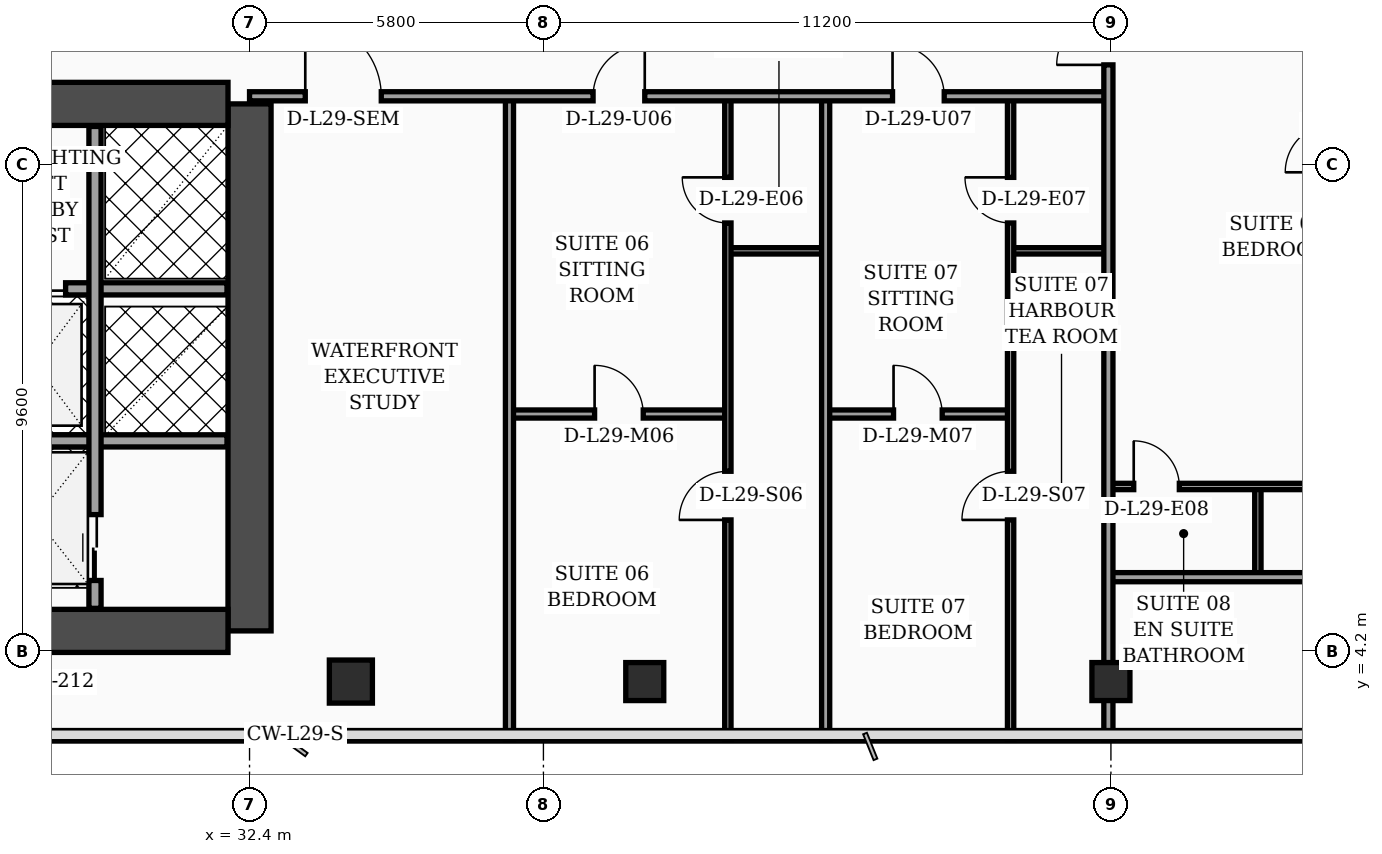
"""IFC4 building model, lengths in metres.
Left out: names, types, materials, properties, quantities, classifications, styles, units other than length and angle.
Written with IfcOpenShell. Run it as: python <this file> out.ifc"""

import sys

from ifc_helpers import new_model, si_unit, direction, frame, frame_2d, origin, origin_2d, place, context, subcontext, project, spatial, rectangle, hollow_rectangle, extrude, element, fill, save


model = new_model("IFC4")
c1 = context("Model", 3, precision=1e-05, world=origin(), true_north=direction((0.0, 1.0)))
c2 = subcontext(c1, "Body", "Model", "MODEL_VIEW")
j1 = project(units=[si_unit("LENGTHUNIT", "METRE"), si_unit("PLANEANGLEUNIT", "RADIAN")], contexts=[c1])
p1 = place(None, origin())
s1 = spatial("IfcSite", under=j1, at=p1, CompositionType="ELEMENT")
p2 = place(p1, origin())
s2 = spatial("IfcBuilding", under=s1, at=p2, CompositionType="ELEMENT")
p3 = place(p2, frame((0.0, 0.0, 120.2)))
s3 = spatial("IfcBuildingStorey", under=s2, at=p3, CompositionType="ELEMENT", Elevation=120.2)
p4 = place(p3, frame((32.4, 4.6, 0.0), z_axis=(0.0, 0.0, 1.0), x_axis=(0.0, 1.0, 0.0)))
e1 = element("IfcWall", 1, at=p4, inside=s3, PredefinedType="SHEAR", context=c2, shape_type="SweptSolid", body=[
    extrude(rectangle(XDim=10.4, YDim=0.85, at=frame_2d((5.2, 0.0))), origin(), (0.0, 0.0, 1.0), 3.56),
])
p5 = place(p3, frame((22.025, 15.0, 0.0), z_axis=(0.0, 0.0, 1.0), x_axis=(1.0, 0.0, 0.0)))
e2 = element("IfcWall", 2, at=p5, inside=s3, PredefinedType="SHEAR", context=c2, shape_type="SweptSolid", body=[
    extrude(rectangle(XDim=9.95, YDim=0.85, at=frame_2d((4.975, 0.0))), origin(), (0.0, 0.0, 1.0), 3.56),
])
p6 = place(p5, frame((4.88, 0.0, 0.0)))
e3 = element("IfcOpeningElement", 3, at=p6, cuts=e2, PredefinedType="OPENING", context=c2, shape_type="SweptSolid", body=[
    extrude(rectangle(XDim=1.1, YDim=2.2, at=frame_2d((0.55, 1.1))), frame((0.0, 0.435, 0.0), z_axis=(0.0, -1.0, 0.0), x_axis=(1.0, 0.0, 0.0)), (0.0, 0.0, 1.0), 0.87),
])
p7 = place(p3, frame((22.025, 4.6, 0.0), z_axis=(0.0, 0.0, 1.0), x_axis=(1.0, 0.0, 0.0)))
e4 = element("IfcWall", 4, at=p7, inside=s3, PredefinedType="SHEAR", context=c2, shape_type="SweptSolid", body=[
    extrude(rectangle(XDim=9.95, YDim=0.85, at=frame_2d((4.975, 0.0))), origin(), (0.0, 0.0, 1.0), 3.56),
])
p8 = place(p3, frame((34.4, 3.6, 0.0), z_axis=(0.0, 0.0, 1.0), x_axis=(1.0, 0.0, 0.0)))
e5 = element("IfcColumn", 5, at=p8, inside=s3, PredefinedType="COLUMN", context=c2, shape_type="SweptSolid", body=[
    extrude(hollow_rectangle(XDim=0.85, YDim=0.85, WallThickness=0.036, at=origin_2d()), origin(), (0.0, 0.0, 1.0), 3.56),
])
for number, where, z_axis, x_axis in (
    (6, (40.2, 3.6, 0.0), (0.0, 0.0, 1.0), (1.0, 0.0, 0.0)),
    (7, (49.4, 3.6, 0.0), (0.0, 0.0, 1.0), (1.0, 0.0, 0.0)),
):
    element("IfcColumn", number, at=place(p3, frame(where, z_axis=z_axis, x_axis=x_axis)), inside=s3, PredefinedType="COLUMN", context=c2, shape_type="SweptSolid", body=[
        extrude(hollow_rectangle(XDim=0.75, YDim=0.75, WallThickness=0.032, at=origin_2d()), origin(), (0.0, 0.0, 1.0), 3.56),
    ])
p9 = place(p3, frame((59.23, 5.505, 0.0), z_axis=(0.0, 0.0, 1.0), x_axis=(-0.300509063924, 0.953778958931, 0.0)))
e8 = element("IfcWall", 8, at=p9, inside=s3, PredefinedType="SOLIDWALL", context=c2, shape_type="SweptSolid", body=[
    extrude(rectangle(XDim=30.814, YDim=0.32, at=frame_2d((15.407, 0.0))), origin(), (0.0, 0.0, 1.0), 3.56),
])
p10 = place(p9, frame((4.747, 0.0, 0.0)))
e9 = element("IfcOpeningElement", 9, at=p10, cuts=e8, PredefinedType="OPENING", context=c2, shape_type="SweptSolid", body=[
    extrude(rectangle(XDim=1.4, YDim=2.25, at=frame_2d((0.7, 1.125))), frame((0.0, 0.17, 0.0), z_axis=(0.0, -1.0, 0.0), x_axis=(1.0, 0.0, 0.0)), (0.0, 0.0, 1.0), 0.34),
])
p11 = place(p9, frame((2.65, 0.0, 0.75)))
e10 = element("IfcOpeningElement", 10, at=p11, cuts=e8, PredefinedType="OPENING", context=c2, shape_type="SweptSolid", body=[
    extrude(rectangle(XDim=1.5, YDim=1.6, at=frame_2d((0.75, 0.8))), frame((0.0, 0.17, 0.0), z_axis=(0.0, -1.0, 0.0), x_axis=(1.0, 0.0, 0.0)), (0.0, 0.0, 1.0), 0.34),
])
p12 = place(p9, frame((7.8, 0.0, 0.75)))
e11 = element("IfcOpeningElement", 11, at=p12, cuts=e8, PredefinedType="OPENING", context=c2, shape_type="SweptSolid", body=[
    extrude(rectangle(XDim=1.5, YDim=1.6, at=frame_2d((0.75, 0.8))), frame((0.0, 0.17, 0.0), z_axis=(0.0, -1.0, 0.0), x_axis=(1.0, 0.0, 0.0)), (0.0, 0.0, 1.0), 0.34),
])
p13 = place(p9, frame((10.9, 0.0, 0.75)))
e12 = element("IfcOpeningElement", 12, at=p13, cuts=e8, PredefinedType="OPENING", context=c2, shape_type="SweptSolid", body=[
    extrude(rectangle(XDim=1.5, YDim=1.6, at=frame_2d((0.75, 0.8))), frame((0.0, 0.17, 0.0), z_axis=(0.0, -1.0, 0.0), x_axis=(1.0, 0.0, 0.0)), (0.0, 0.0, 1.0), 0.34),
])
p14 = place(p9, frame((14.0, 0.0, 0.75)))
e13 = element("IfcOpeningElement", 13, at=p14, cuts=e8, PredefinedType="OPENING", context=c2, shape_type="SweptSolid", body=[
    extrude(rectangle(XDim=1.5, YDim=1.6, at=frame_2d((0.75, 0.8))), frame((0.0, 0.17, 0.0), z_axis=(0.0, -1.0, 0.0), x_axis=(1.0, 0.0, 0.0)), (0.0, 0.0, 1.0), 0.34),
])
p15 = place(p9, frame((17.1, 0.0, 0.75)))
e14 = element("IfcOpeningElement", 14, at=p15, cuts=e8, PredefinedType="OPENING", context=c2, shape_type="SweptSolid", body=[
    extrude(rectangle(XDim=1.5, YDim=1.6, at=frame_2d((0.75, 0.8))), frame((0.0, 0.17, 0.0), z_axis=(0.0, -1.0, 0.0), x_axis=(1.0, 0.0, 0.0)), (0.0, 0.0, 1.0), 0.34),
])
p16 = place(p9, frame((20.2, 0.0, 0.75)))
e15 = element("IfcOpeningElement", 15, at=p16, cuts=e8, PredefinedType="OPENING", context=c2, shape_type="SweptSolid", body=[
    extrude(rectangle(XDim=1.5, YDim=1.6, at=frame_2d((0.75, 0.8))), frame((0.0, 0.17, 0.0), z_axis=(0.0, -1.0, 0.0), x_axis=(1.0, 0.0, 0.0)), (0.0, 0.0, 1.0), 0.34),
])
p17 = place(p9, frame((23.3, 0.0, 0.75)))
e16 = element("IfcOpeningElement", 16, at=p17, cuts=e8, PredefinedType="OPENING", context=c2, shape_type="SweptSolid", body=[
    extrude(rectangle(XDim=1.5, YDim=1.6, at=frame_2d((0.75, 0.8))), frame((0.0, 0.17, 0.0), z_axis=(0.0, -1.0, 0.0), x_axis=(1.0, 0.0, 0.0)), (0.0, 0.0, 1.0), 0.34),
])
p18 = place(p9, frame((26.4, 0.0, 0.75)))
e17 = element("IfcOpeningElement", 17, at=p18, cuts=e8, PredefinedType="OPENING", context=c2, shape_type="SweptSolid", body=[
    extrude(rectangle(XDim=1.5, YDim=1.6, at=frame_2d((0.75, 0.8))), frame((0.0, 0.17, 0.0), z_axis=(0.0, -1.0, 0.0), x_axis=(1.0, 0.0, 0.0)), (0.0, 0.0, 1.0), 0.34),
])
p19 = place(p3, frame((27.02, 11.35, 0.0), z_axis=(0.0, 0.0, 1.0), x_axis=(1.0, 0.0, 0.0)))
e18 = element("IfcWall", 18, at=p19, inside=s3, PredefinedType="SOLIDWALL", context=c2, shape_type="SweptSolid", body=[
    extrude(rectangle(XDim=4.935, YDim=0.24, at=frame_2d((2.468, 0.0))), origin(), (0.0, 0.0, 1.0), 3.56),
])
p20 = place(p19, frame((0.45, 0.0, 0.0)))
e19 = element("IfcOpeningElement", 19, at=p20, cuts=e18, PredefinedType="OPENING", context=c2, shape_type="SweptSolid", body=[
    extrude(rectangle(XDim=1.3, YDim=2.35, at=frame_2d((0.65, 1.175))), frame((0.0, 0.13, 0.0), z_axis=(0.0, -1.0, 0.0), x_axis=(1.0, 0.0, 0.0)), (0.0, 0.0, 1.0), 0.26),
])
p21 = place(p3, frame((27.02, 8.35, 0.0), z_axis=(0.0, 0.0, 1.0), x_axis=(1.0, 0.0, 0.0)))
e20 = element("IfcWall", 20, at=p21, inside=s3, PredefinedType="SOLIDWALL", context=c2, shape_type="SweptSolid", body=[
    extrude(rectangle(XDim=4.935, YDim=0.24, at=frame_2d((2.468, 0.0))), origin(), (0.0, 0.0, 1.0), 3.09),
])
p22 = place(p3, frame((29.35, 5.045, 0.0), z_axis=(0.0, 0.0, 1.0), x_axis=(0.0, 1.0, 0.0)))
e21 = element("IfcWall", 21, at=p22, inside=s3, PredefinedType="SOLIDWALL", context=c2, shape_type="SweptSolid", body=[
    extrude(rectangle(XDim=9.51, YDim=0.24, at=frame_2d((4.755, 0.0))), origin(), (0.0, 0.0, 1.0), 3.56),
])
p23 = place(p22, frame((0.55, 0.0, 0.0)))
e22 = element("IfcOpeningElement", 22, at=p23, cuts=e21, PredefinedType="OPENING", context=c2, shape_type="SweptSolid", body=[
    extrude(rectangle(XDim=1.3, YDim=2.35, at=frame_2d((0.65, 1.175))), frame((0.0, 0.13, 0.0), z_axis=(0.0, -1.0, 0.0), x_axis=(1.0, 0.0, 0.0)), (0.0, 0.0, 1.0), 0.26),
])
p24 = place(p3, frame((41.84, 12.1, 0.0), z_axis=(0.0, 0.0, 1.0), x_axis=(1.0, 0.0, 0.0)))
e23 = element("IfcWall", 23, at=p24, inside=s3, PredefinedType="PARTITIONING", context=c2, shape_type="SweptSolid", body=[
    extrude(rectangle(XDim=1.93, YDim=0.125, at=frame_2d((0.965, 0.0))), origin(), (0.0, 0.0, 1.0), 3.56),
])
p25 = place(p3, frame((37.53, 8.88, 0.0), z_axis=(0.0, 0.0, 1.0), x_axis=(1.0, 0.0, 0.0)))
e24 = element("IfcWall", 24, at=p25, inside=s3, PredefinedType="PARTITIONING", context=c2, shape_type="SweptSolid", body=[
    extrude(rectangle(XDim=4.31, YDim=0.16, at=frame_2d((2.155, 0.0))), origin(), (0.0, 0.0, 1.0), 3.09),
])
p26 = place(p25, frame((1.68, 0.0, 0.0)))
e25 = element("IfcOpeningElement", 25, at=p26, cuts=e24, PredefinedType="OPENING", context=c2, shape_type="SweptSolid", body=[
    extrude(rectangle(XDim=0.96, YDim=2.2, at=frame_2d((0.48, 1.1))), frame((0.0, 0.09, 0.0), z_axis=(0.0, -1.0, 0.0), x_axis=(1.0, 0.0, 0.0)), (0.0, 0.0, 1.0), 0.18),
])
p27 = place(p3, frame((41.84, 2.44, 0.0), z_axis=(0.0, 0.0, 1.0), x_axis=(0.0, 1.0, 0.0)))
e26 = element("IfcWall", 26, at=p27, inside=s3, PredefinedType="PARTITIONING", context=c2, shape_type="SweptSolid", body=[
    extrude(rectangle(XDim=12.71, YDim=0.125, at=frame_2d((6.355, 0.0))), origin(), (0.0, 0.0, 1.0), 3.04),
])
p28 = place(p27, frame((4.35, 0.0, 0.0)))
e27 = element("IfcOpeningElement", 27, at=p28, cuts=e26, PredefinedType="OPENING", context=c2, shape_type="SweptSolid", body=[
    extrude(rectangle(XDim=0.96, YDim=2.2, at=frame_2d((0.48, 1.1))), frame((0.0, 0.073, 0.0), z_axis=(0.0, -1.0, 0.0), x_axis=(1.0, 0.0, 0.0)), (0.0, 0.0, 1.0), 0.145),
])
p29 = place(p27, frame((10.21, 0.0, 0.0)))
e28 = element("IfcOpeningElement", 28, at=p29, cuts=e26, PredefinedType="OPENING", context=c2, shape_type="SweptSolid", body=[
    extrude(rectangle(XDim=0.9, YDim=2.15, at=frame_2d((0.45, 1.075))), frame((0.0, 0.073, 0.0), z_axis=(0.0, -1.0, 0.0), x_axis=(1.0, 0.0, 0.0)), (0.0, 0.0, 1.0), 0.145),
])
p30 = place(p3, frame((37.53, 2.44, 0.0), z_axis=(0.0, 0.0, 1.0), x_axis=(0.0, 1.0, 0.0)))
e29 = element("IfcWall", 29, at=p30, inside=s3, PredefinedType="PARTITIONING", context=c2, shape_type="SweptSolid", body=[
    extrude(rectangle(XDim=12.71, YDim=0.16, at=frame_2d((6.355, 0.0))), origin(), (0.0, 0.0, 1.0), 2.84),
])
p31 = place(p3, frame((47.42, 12.1, 0.0), z_axis=(0.0, 0.0, 1.0), x_axis=(1.0, 0.0, 0.0)))
e30 = element("IfcWall", 30, at=p31, inside=s3, PredefinedType="PARTITIONING", context=c2, shape_type="SweptSolid", body=[
    extrude(rectangle(XDim=1.93, YDim=0.125, at=frame_2d((0.965, 0.0))), origin(), (0.0, 0.0, 1.0), 2.84),
])
p32 = place(p3, frame((43.77, 8.88, 0.0), z_axis=(0.0, 0.0, 1.0), x_axis=(1.0, 0.0, 0.0)))
e31 = element("IfcWall", 31, at=p32, inside=s3, PredefinedType="PARTITIONING", context=c2, shape_type="SweptSolid", body=[
    extrude(rectangle(XDim=3.65, YDim=0.16, at=frame_2d((1.825, 0.0))), origin(), (0.0, 0.0, 1.0), 3.09),
])
p33 = place(p32, frame((1.34, 0.0, 0.0)))
e32 = element("IfcOpeningElement", 32, at=p33, cuts=e31, PredefinedType="OPENING", context=c2, shape_type="SweptSolid", body=[
    extrude(rectangle(XDim=0.96, YDim=2.2, at=frame_2d((0.48, 1.1))), frame((0.0, 0.09, 0.0), z_axis=(0.0, -1.0, 0.0), x_axis=(1.0, 0.0, 0.0)), (0.0, 0.0, 1.0), 0.18),
])
p34 = place(p3, frame((47.42, 2.44, 0.0), z_axis=(0.0, 0.0, 1.0), x_axis=(0.0, 1.0, 0.0)))
e33 = element("IfcWall", 33, at=p34, inside=s3, PredefinedType="PARTITIONING", context=c2, shape_type="SweptSolid", body=[
    extrude(rectangle(XDim=12.71, YDim=0.125, at=frame_2d((6.355, 0.0))), origin(), (0.0, 0.0, 1.0), 2.84),
])
p35 = place(p34, frame((4.35, 0.0, 0.0)))
e34 = element("IfcOpeningElement", 34, at=p35, cuts=e33, PredefinedType="OPENING", context=c2, shape_type="SweptSolid", body=[
    extrude(rectangle(XDim=0.96, YDim=2.2, at=frame_2d((0.48, 1.1))), frame((0.0, 0.073, 0.0), z_axis=(0.0, -1.0, 0.0), x_axis=(1.0, 0.0, 0.0)), (0.0, 0.0, 1.0), 0.145),
])
p36 = place(p34, frame((10.21, 0.0, 0.0)))
e35 = element("IfcOpeningElement", 35, at=p36, cuts=e33, PredefinedType="OPENING", context=c2, shape_type="SweptSolid", body=[
    extrude(rectangle(XDim=0.9, YDim=2.15, at=frame_2d((0.45, 1.075))), frame((0.0, 0.073, 0.0), z_axis=(0.0, -1.0, 0.0), x_axis=(1.0, 0.0, 0.0)), (0.0, 0.0, 1.0), 0.145),
])
p37 = place(p3, frame((43.77, 2.44, 0.0), z_axis=(0.0, 0.0, 1.0), x_axis=(0.0, 1.0, 0.0)))
e36 = element("IfcWall", 36, at=p37, inside=s3, PredefinedType="PARTITIONING", context=c2, shape_type="SweptSolid", body=[
    extrude(rectangle(XDim=12.71, YDim=0.16, at=frame_2d((6.355, 0.0))), origin(), (0.0, 0.0, 1.0), 3.04),
])
p38 = place(p3, frame((32.4, 15.15, 0.0), z_axis=(0.0, 0.0, 1.0), x_axis=(1.0, 0.0, 0.0)))
e37 = element("IfcWall", 37, at=p38, inside=s3, PredefinedType="PARTITIONING", context=c2, shape_type="SweptSolid", body=[
    extrude(rectangle(XDim=16.95, YDim=0.18, at=frame_2d((8.475, 0.0))), origin(), (0.0, 0.0, 1.0), 2.84),
])
p39 = place(p38, frame((1.1, 0.0, 0.0)))
e38 = element("IfcOpeningElement", 38, at=p39, cuts=e37, PredefinedType="OPENING", context=c2, shape_type="SweptSolid", body=[
    extrude(rectangle(XDim=1.5, YDim=2.22, at=frame_2d((0.75, 1.11))), frame((0.0, 0.1, 0.0), z_axis=(0.0, -1.0, 0.0), x_axis=(1.0, 0.0, 0.0)), (0.0, 0.0, 1.0), 0.2),
])
p40 = place(p38, frame((6.78, 0.0, 0.0)))
e39 = element("IfcOpeningElement", 39, at=p40, cuts=e37, PredefinedType="OPENING", context=c2, shape_type="SweptSolid", body=[
    extrude(rectangle(XDim=1.02, YDim=2.2, at=frame_2d((0.51, 1.1))), frame((0.0, 0.1, 0.0), z_axis=(0.0, -1.0, 0.0), x_axis=(1.0, 0.0, 0.0)), (0.0, 0.0, 1.0), 0.2),
])
p41 = place(p38, frame((12.69, 0.0, 0.0)))
e40 = element("IfcOpeningElement", 40, at=p41, cuts=e37, PredefinedType="OPENING", context=c2, shape_type="SweptSolid", body=[
    extrude(rectangle(XDim=1.02, YDim=2.2, at=frame_2d((0.51, 1.1))), frame((0.0, 0.1, 0.0), z_axis=(0.0, -1.0, 0.0), x_axis=(1.0, 0.0, 0.0)), (0.0, 0.0, 1.0), 0.2),
])
p42 = place(p3, frame((52.3, 5.66, 0.0), z_axis=(0.0, 0.0, 1.0), x_axis=(0.0, 1.0, 0.0)))
e41 = element("IfcWall", 41, at=p42, inside=s3, PredefinedType="PARTITIONING", context=c2, shape_type="SweptSolid", body=[
    extrude(rectangle(XDim=1.79, YDim=0.125, at=frame_2d((0.895, 0.0))), origin(), (0.0, 0.0, 1.0), 3.56),
])
p43 = place(p3, frame((49.35, 7.45, 0.0), z_axis=(0.0, 0.0, 1.0), x_axis=(1.0, 0.0, 0.0)))
e42 = element("IfcWall", 42, at=p43, inside=s3, PredefinedType="PARTITIONING", context=c2, shape_type="SweptSolid", body=[
    extrude(rectangle(XDim=9.21, YDim=0.125, at=frame_2d((4.605, 0.0))), origin(), (0.0, 0.0, 1.0), 3.04),
])
p44 = place(p43, frame((0.5, 0.0, 0.0)))
e43 = element("IfcOpeningElement", 43, at=p44, cuts=e42, PredefinedType="OPENING", context=c2, shape_type="SweptSolid", body=[
    extrude(rectangle(XDim=0.9, YDim=2.15, at=frame_2d((0.45, 1.075))), frame((0.0, 0.073, 0.0), z_axis=(0.0, -1.0, 0.0), x_axis=(1.0, 0.0, 0.0)), (0.0, 0.0, 1.0), 0.145),
])
p45 = place(p43, frame((5.04, 0.0, 0.0)))
e44 = element("IfcOpeningElement", 44, at=p45, cuts=e42, PredefinedType="OPENING", context=c2, shape_type="SweptSolid", body=[
    extrude(rectangle(XDim=0.96, YDim=2.2, at=frame_2d((0.48, 1.1))), frame((0.0, 0.073, 0.0), z_axis=(0.0, -1.0, 0.0), x_axis=(1.0, 0.0, 0.0)), (0.0, 0.0, 1.0), 0.145),
])
p46 = place(p3, frame((49.35, 5.66, 0.0), z_axis=(0.0, 0.0, 1.0), x_axis=(1.0, 0.0, 0.0)))
e45 = element("IfcWall", 45, at=p46, inside=s3, PredefinedType="PARTITIONING", context=c2, shape_type="SweptSolid", body=[
    extrude(rectangle(XDim=6.65, YDim=0.18, at=frame_2d((3.325, 0.0))), origin(), (0.0, 0.0, 1.0), 2.84),
])
p47 = place(p3, frame((49.35, 2.44, 0.0), z_axis=(0.0, 0.0, 1.0), x_axis=(0.0, 1.0, 0.0)))
e46 = element("IfcWall", 46, at=p47, inside=s3, PredefinedType="PARTITIONING", context=c2, shape_type="SweptSolid", body=[
    extrude(rectangle(XDim=18.36, YDim=0.18, at=frame_2d((9.18, 0.0))), origin(), (0.0, 0.0, 1.0), 2.84),
])
p48 = place(p47, frame((13.33, 0.0, 0.0)))
e47 = element("IfcOpeningElement", 47, at=p48, cuts=e46, PredefinedType="OPENING", context=c2, shape_type="SweptSolid", body=[
    extrude(rectangle(XDim=1.02, YDim=2.2, at=frame_2d((0.51, 1.1))), frame((0.0, 0.1, 0.0), z_axis=(0.0, -1.0, 0.0), x_axis=(1.0, 0.0, 0.0)), (0.0, 0.0, 1.0), 0.2),
])
p49 = place(p20, origin())
e48 = element("IfcDoor", 48, at=p49, inside=s3, OperationType="DOUBLE_DOOR_SLIDING", PredefinedType="DOOR", context=c2, shape_type="SweptSolid", body=[
    extrude(rectangle(XDim=1.3, YDim=2.35, at=frame_2d((0.65, 1.175))), frame((0.0, 0.025, 0.0), z_axis=(0.0, -1.0, 0.0), x_axis=(1.0, 0.0, 0.0)), (0.0, 0.0, 1.0), 0.05),
])
fill(e19, e48)
p50 = place(p23, origin())
e49 = element("IfcDoor", 49, at=p50, inside=s3, OperationType="DOUBLE_DOOR_SLIDING", PredefinedType="DOOR", context=c2, shape_type="SweptSolid", body=[
    extrude(rectangle(XDim=1.3, YDim=2.35, at=frame_2d((0.65, 1.175))), frame((0.0, 0.025, 0.0), z_axis=(0.0, -1.0, 0.0), x_axis=(1.0, 0.0, 0.0)), (0.0, 0.0, 1.0), 0.05),
])
fill(e22, e49)
p51 = place(p26, origin())
e50 = element("IfcDoor", 50, at=p51, inside=s3, OperationType="SINGLE_SWING_LEFT", PredefinedType="DOOR", context=c2, shape_type="SweptSolid", body=[
    extrude(rectangle(XDim=0.96, YDim=2.2, at=frame_2d((0.48, 1.1))), frame((0.0, 0.025, 0.0), z_axis=(0.0, -1.0, 0.0), x_axis=(1.0, 0.0, 0.0)), (0.0, 0.0, 1.0), 0.05),
])
fill(e25, e50)
p52 = place(p28, origin())
e51 = element("IfcDoor", 51, at=p52, inside=s3, OperationType="SINGLE_SWING_LEFT", PredefinedType="DOOR", context=c2, shape_type="SweptSolid", body=[
    extrude(rectangle(XDim=0.96, YDim=2.2, at=frame_2d((0.48, 1.1))), frame((0.0, 0.025, 0.0), z_axis=(0.0, -1.0, 0.0), x_axis=(1.0, 0.0, 0.0)), (0.0, 0.0, 1.0), 0.05),
])
fill(e27, e51)
p53 = place(p29, origin())
e52 = element("IfcDoor", 52, at=p53, inside=s3, OperationType="SINGLE_SWING_RIGHT", PredefinedType="DOOR", context=c2, shape_type="SweptSolid", body=[
    extrude(rectangle(XDim=0.9, YDim=2.15, at=frame_2d((0.45, 1.075))), frame((0.0, 0.025, 0.0), z_axis=(0.0, -1.0, 0.0), x_axis=(1.0, 0.0, 0.0)), (0.0, 0.0, 1.0), 0.05),
])
fill(e28, e52)
p54 = place(p33, origin())
e53 = element("IfcDoor", 53, at=p54, inside=s3, OperationType="SINGLE_SWING_LEFT", PredefinedType="DOOR", context=c2, shape_type="SweptSolid", body=[
    extrude(rectangle(XDim=0.96, YDim=2.2, at=frame_2d((0.48, 1.1))), frame((0.0, 0.025, 0.0), z_axis=(0.0, -1.0, 0.0), x_axis=(1.0, 0.0, 0.0)), (0.0, 0.0, 1.0), 0.05),
])
fill(e32, e53)
p55 = place(p35, origin())
e54 = element("IfcDoor", 54, at=p55, inside=s3, OperationType="SINGLE_SWING_LEFT", PredefinedType="DOOR", context=c2, shape_type="SweptSolid", body=[
    extrude(rectangle(XDim=0.96, YDim=2.2, at=frame_2d((0.48, 1.1))), frame((0.0, 0.025, 0.0), z_axis=(0.0, -1.0, 0.0), x_axis=(1.0, 0.0, 0.0)), (0.0, 0.0, 1.0), 0.05),
])
fill(e34, e54)
p56 = place(p36, origin())
e55 = element("IfcDoor", 55, at=p56, inside=s3, OperationType="SINGLE_SWING_RIGHT", PredefinedType="DOOR", context=c2, shape_type="SweptSolid", body=[
    extrude(rectangle(XDim=0.9, YDim=2.15, at=frame_2d((0.45, 1.075))), frame((0.0, 0.025, 0.0), z_axis=(0.0, -1.0, 0.0), x_axis=(1.0, 0.0, 0.0)), (0.0, 0.0, 1.0), 0.05),
])
fill(e35, e55)
p57 = place(p39, origin())
e56 = element("IfcDoor", 56, at=p57, inside=s3, OperationType="SINGLE_SWING_LEFT", PredefinedType="DOOR", context=c2, shape_type="SweptSolid", body=[
    extrude(rectangle(XDim=1.5, YDim=2.22, at=frame_2d((0.75, 1.11))), frame((0.0, 0.025, 0.0), z_axis=(0.0, -1.0, 0.0), x_axis=(1.0, 0.0, 0.0)), (0.0, 0.0, 1.0), 0.05),
])
fill(e38, e56)
p58 = place(p40, origin())
e57 = element("IfcDoor", 57, at=p58, inside=s3, OperationType="SINGLE_SWING_RIGHT", PredefinedType="DOOR", context=c2, shape_type="SweptSolid", body=[
    extrude(rectangle(XDim=1.02, YDim=2.2, at=frame_2d((0.51, 1.1))), frame((0.0, 0.025, 0.0), z_axis=(0.0, -1.0, 0.0), x_axis=(1.0, 0.0, 0.0)), (0.0, 0.0, 1.0), 0.05),
])
fill(e39, e57)
p59 = place(p41, origin())
e58 = element("IfcDoor", 58, at=p59, inside=s3, OperationType="SINGLE_SWING_LEFT", PredefinedType="DOOR", context=c2, shape_type="SweptSolid", body=[
    extrude(rectangle(XDim=1.02, YDim=2.2, at=frame_2d((0.51, 1.1))), frame((0.0, 0.025, 0.0), z_axis=(0.0, -1.0, 0.0), x_axis=(1.0, 0.0, 0.0)), (0.0, 0.0, 1.0), 0.05),
])
fill(e40, e58)
p60 = place(p44, origin())
e59 = element("IfcDoor", 59, at=p60, inside=s3, OperationType="SINGLE_SWING_LEFT", PredefinedType="DOOR", context=c2, shape_type="SweptSolid", body=[
    extrude(rectangle(XDim=0.9, YDim=2.15, at=frame_2d((0.45, 1.075))), frame((0.0, 0.025, 0.0), z_axis=(0.0, -1.0, 0.0), x_axis=(1.0, 0.0, 0.0)), (0.0, 0.0, 1.0), 0.05),
])
fill(e43, e59)
p61 = place(p48, origin())
e60 = element("IfcDoor", 60, at=p61, inside=s3, OperationType="SINGLE_SWING_LEFT", PredefinedType="DOOR", context=c2, shape_type="SweptSolid", body=[
    extrude(rectangle(XDim=1.02, YDim=2.2, at=frame_2d((0.51, 1.1))), frame((0.0, 0.025, 0.0), z_axis=(0.0, -1.0, 0.0), x_axis=(1.0, 0.0, 0.0)), (0.0, 0.0, 1.0), 0.05),
])
fill(e47, e60)
save(model, sys.argv[1])
